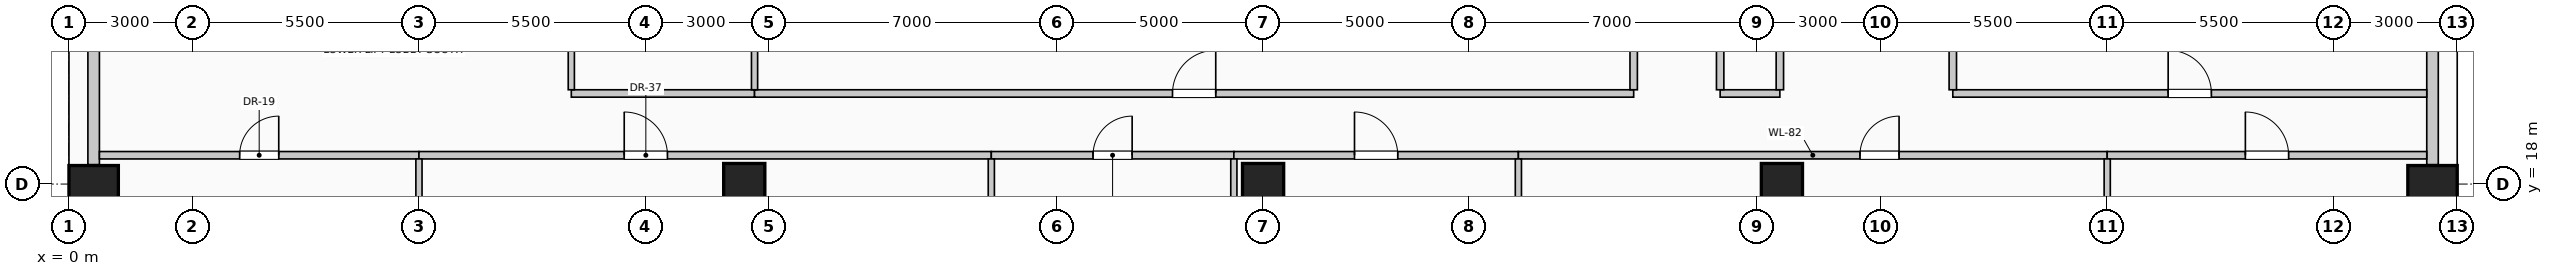
"""IFC4 building model, lengths in metres.
Left out: names, types, materials, properties, quantities, classifications, styles, units other than length and angle.
Written with IfcOpenShell. Run it as: python <this file> out.ifc"""

import sys

from ifc_helpers import new_model, si_unit, direction, frame, frame_2d, origin, origin_2d, place, context, subcontext, project, spatial, rectangle, circle, extrude, element, fill, save


model = new_model("IFC4")
c1 = context("Model", 3, precision=1e-05, world=origin(), true_north=direction((0.0, 1.0)))
c2 = subcontext(c1, "Body", "Model", "MODEL_VIEW")
j1 = project(units=[si_unit("LENGTHUNIT", "METRE"), si_unit("PLANEANGLEUNIT", "RADIAN")], contexts=[c1])
p1 = place(None, origin())
s1 = spatial("IfcSite", under=j1, at=p1, CompositionType="ELEMENT")
p2 = place(p1, origin())
s2 = spatial("IfcBuilding", under=s1, at=p2, CompositionType="ELEMENT")
p3 = place(p2, frame((0.0, 0.0, 74.6)))
s3 = spatial("IfcBuildingStorey", under=s2, at=p3, CompositionType="ELEMENT", Elevation=74.6)
for number, where, z_axis, x_axis in (
    (1, (0.6, 18.0, 0.0), (0.0, 0.0, 1.0), (0.0, 1.0, 0.0)),
    (2, (57.4, 18.0, 0.0), (0.0, 0.0, 1.0), (0.0, 1.0, 0.0)),
):
    element("IfcColumn", number, at=place(p3, frame(where, z_axis=z_axis, x_axis=x_axis)), inside=s3, PredefinedType="COLUMN", context=c2, shape_type="SweptSolid", body=[
        extrude(rectangle(XDim=0.9, YDim=1.2, at=origin_2d()), origin(), (0.0, 0.0, 1.0), 4.0),
    ])
for number, where, z_axis, x_axis in (
    (3, (16.4, 18.0, 0.0), (0.0, 0.0, 1.0), (1.0, 0.0, 0.0)),
    (4, (29.0, 18.0, 0.0), (0.0, 0.0, 1.0), (1.0, 0.0, 0.0)),
    (5, (41.6, 18.0, 0.0), (0.0, 0.0, 1.0), (1.0, 0.0, 0.0)),
):
    element("IfcColumn", number, at=place(p3, frame(where, z_axis=z_axis, x_axis=x_axis)), inside=s3, PredefinedType="COLUMN", context=c2, shape_type="SweptSolid", body=[
        extrude(circle(Radius=0.5, at=origin_2d()), origin(), (0.0, 0.0, 1.0), 4.0),
    ])
for number, where, z_axis, x_axis in (
    (6, (0.6, 18.47, 0.0), (0.0, 0.0, 1.0), (0.0, 1.0, 0.0)),
    (7, (57.4, 25.53, 0.0), (0.0, 0.0, 1.0), (0.0, -1.0, 0.0)),
):
    element("IfcWall", number, at=place(p3, frame(where, z_axis=z_axis, x_axis=x_axis)), inside=s3, PredefinedType="SOLIDWALL", context=c2, shape_type="SweptSolid", body=[
        extrude(rectangle(XDim=7.06, YDim=0.28, at=frame_2d((3.53, 0.0))), origin(), (0.0, 0.0, 1.0), 2.85),
    ])
p4 = place(p3, frame((0.74, 18.7, 0.0), z_axis=(0.0, 0.0, 1.0), x_axis=(1.0, 0.0, 0.0)))
e8 = element("IfcWall", 8, at=p4, inside=s3, PredefinedType="PARTITIONING", context=c2, shape_type="SweptSolid", body=[
    extrude(rectangle(XDim=7.76, YDim=0.18, at=frame_2d((3.88, 0.0))), origin(), (0.0, 0.0, 1.0), 3.7),
])
p5 = place(p4, frame((3.405, 0.0, 0.0)))
e9 = element("IfcOpeningElement", 9, at=p5, cuts=e8, PredefinedType="OPENING", context=c2, shape_type="SweptSolid", body=[
    extrude(rectangle(XDim=0.95, YDim=2.15, at=frame_2d((0.475, 1.075))), frame((0.0, 0.1, 0.0), z_axis=(0.0, -1.0, 0.0), x_axis=(1.0, 0.0, 0.0)), (0.0, 0.0, 1.0), 0.2),
])
p6 = place(p3, frame((8.5, 18.7, 0.0), z_axis=(0.0, 0.0, 1.0), x_axis=(1.0, 0.0, 0.0)))
e10 = element("IfcWall", 10, at=p6, inside=s3, PredefinedType="PARTITIONING", context=c2, shape_type="SweptSolid", body=[
    extrude(rectangle(XDim=13.9, YDim=0.18, at=frame_2d((6.95, 0.0))), origin(), (0.0, 0.0, 1.0), 3.7),
])
p7 = place(p6, frame((4.985, 0.0, 0.0)))
e11 = element("IfcOpeningElement", 11, at=p7, cuts=e10, PredefinedType="OPENING", context=c2, shape_type="SweptSolid", body=[
    extrude(rectangle(XDim=1.05, YDim=2.15, at=frame_2d((0.525, 1.075))), frame((0.0, 0.1, 0.0), z_axis=(0.0, -1.0, 0.0), x_axis=(1.0, 0.0, 0.0)), (0.0, 0.0, 1.0), 0.2),
])
p8 = place(p3, frame((22.4, 18.7, 0.0), z_axis=(0.0, 0.0, 1.0), x_axis=(1.0, 0.0, 0.0)))
e12 = element("IfcWall", 12, at=p8, inside=s3, PredefinedType="PARTITIONING", context=c2, shape_type="SweptSolid", body=[
    extrude(rectangle(XDim=5.89, YDim=0.18, at=frame_2d((2.945, 0.0))), origin(), (0.0, 0.0, 1.0), 3.7),
])
p9 = place(p8, frame((2.47, 0.0, 0.0)))
e13 = element("IfcOpeningElement", 13, at=p9, cuts=e12, PredefinedType="OPENING", context=c2, shape_type="SweptSolid", body=[
    extrude(rectangle(XDim=0.95, YDim=2.15, at=frame_2d((0.475, 1.075))), frame((0.0, 0.1, 0.0), z_axis=(0.0, -1.0, 0.0), x_axis=(1.0, 0.0, 0.0)), (0.0, 0.0, 1.0), 0.2),
])
p10 = place(p3, frame((28.29, 18.7, 0.0), z_axis=(0.0, 0.0, 1.0), x_axis=(1.0, 0.0, 0.0)))
e14 = element("IfcWall", 14, at=p10, inside=s3, PredefinedType="PARTITIONING", context=c2, shape_type="SweptSolid", body=[
    extrude(rectangle(XDim=6.91, YDim=0.18, at=frame_2d((3.455, 0.0))), origin(), (0.0, 0.0, 1.0), 3.7),
])
p11 = place(p10, frame((2.93, 0.0, 0.0)))
e15 = element("IfcOpeningElement", 15, at=p11, cuts=e14, PredefinedType="OPENING", context=c2, shape_type="SweptSolid", body=[
    extrude(rectangle(XDim=1.05, YDim=2.15, at=frame_2d((0.525, 1.075))), frame((0.0, 0.1, 0.0), z_axis=(0.0, -1.0, 0.0), x_axis=(1.0, 0.0, 0.0)), (0.0, 0.0, 1.0), 0.2),
])
p12 = place(p3, frame((35.2, 18.7, 0.0), z_axis=(0.0, 0.0, 1.0), x_axis=(1.0, 0.0, 0.0)))
e16 = element("IfcWall", 16, at=p12, inside=s3, PredefinedType="PARTITIONING", context=c2, shape_type="SweptSolid", body=[
    extrude(rectangle(XDim=14.3, YDim=0.18, at=frame_2d((7.15, 0.0))), origin(), (0.0, 0.0, 1.0), 3.7),
])
p13 = place(p12, frame((8.295, 0.0, 0.0)))
e17 = element("IfcOpeningElement", 17, at=p13, cuts=e16, PredefinedType="OPENING", context=c2, shape_type="SweptSolid", body=[
    extrude(rectangle(XDim=0.95, YDim=2.15, at=frame_2d((0.475, 1.075))), frame((0.0, 0.1, 0.0), z_axis=(0.0, -1.0, 0.0), x_axis=(1.0, 0.0, 0.0)), (0.0, 0.0, 1.0), 0.2),
])
p14 = place(p3, frame((49.5, 18.7, 0.0), z_axis=(0.0, 0.0, 1.0), x_axis=(1.0, 0.0, 0.0)))
e18 = element("IfcWall", 18, at=p14, inside=s3, PredefinedType="PARTITIONING", context=c2, shape_type="SweptSolid", body=[
    extrude(rectangle(XDim=7.76, YDim=0.18, at=frame_2d((3.88, 0.0))), origin(), (0.0, 0.0, 1.0), 3.7),
])
p15 = place(p14, frame((3.355, 0.0, 0.0)))
e19 = element("IfcOpeningElement", 19, at=p15, cuts=e18, PredefinedType="OPENING", context=c2, shape_type="SweptSolid", body=[
    extrude(rectangle(XDim=1.05, YDim=2.15, at=frame_2d((0.525, 1.075))), frame((0.0, 0.1, 0.0), z_axis=(0.0, -1.0, 0.0), x_axis=(1.0, 0.0, 0.0)), (0.0, 0.0, 1.0), 0.2),
])
p16 = place(p3, frame((12.2, 20.2, 0.0), z_axis=(0.0, 0.0, 1.0), x_axis=(1.0, 0.0, 0.0)))
e20 = element("IfcWall", 20, at=p16, inside=s3, PredefinedType="PARTITIONING", context=c2, shape_type="SweptSolid", body=[
    extrude(rectangle(XDim=4.45, YDim=0.18, at=frame_2d((2.225, 0.0))), origin(), (0.0, 0.0, 1.0), 3.7),
])
p17 = place(p3, frame((16.65, 20.2, 0.0), z_axis=(0.0, 0.0, 1.0), x_axis=(1.0, 0.0, 0.0)))
e21 = element("IfcWall", 21, at=p17, inside=s3, PredefinedType="PARTITIONING", context=c2, shape_type="SweptSolid", body=[
    extrude(rectangle(XDim=21.35, YDim=0.18, at=frame_2d((10.675, 0.0))), origin(), (0.0, 0.0, 1.0), 3.7),
])
p18 = place(p17, frame((10.15, 0.0, 0.0)))
e22 = element("IfcOpeningElement", 22, at=p18, cuts=e21, PredefinedType="OPENING", context=c2, shape_type="SweptSolid", body=[
    extrude(rectangle(XDim=1.05, YDim=2.15, at=frame_2d((0.525, 1.075))), frame((0.0, 0.1, 0.0), z_axis=(0.0, -1.0, 0.0), x_axis=(1.0, 0.0, 0.0)), (0.0, 0.0, 1.0), 0.2),
])
p19 = place(p3, frame((40.1, 20.2, 0.0), z_axis=(0.0, 0.0, 1.0), x_axis=(1.0, 0.0, 0.0)))
e23 = element("IfcWall", 23, at=p19, inside=s3, PredefinedType="PARTITIONING", context=c2, shape_type="SweptSolid", body=[
    extrude(rectangle(XDim=1.45, YDim=0.18, at=frame_2d((0.725, 0.0))), origin(), (0.0, 0.0, 1.0), 3.7),
])
p20 = place(p3, frame((45.75, 20.2, 0.0), z_axis=(0.0, 0.0, 1.0), x_axis=(1.0, 0.0, 0.0)))
e24 = element("IfcWall", 24, at=p20, inside=s3, PredefinedType="PARTITIONING", context=c2, shape_type="SweptSolid", body=[
    extrude(rectangle(XDim=11.51, YDim=0.18, at=frame_2d((5.755, 0.0))), origin(), (0.0, 0.0, 1.0), 3.7),
])
p21 = place(p20, frame((5.23, 0.0, 0.0)))
e25 = element("IfcOpeningElement", 25, at=p21, cuts=e24, PredefinedType="OPENING", context=c2, shape_type="SweptSolid", body=[
    extrude(rectangle(XDim=1.05, YDim=2.15, at=frame_2d((0.525, 1.075))), frame((0.0, 0.1, 0.0), z_axis=(0.0, -1.0, 0.0), x_axis=(1.0, 0.0, 0.0)), (0.0, 0.0, 1.0), 0.2),
])
p22 = place(p3, frame((8.5, 1.2, 0.0), z_axis=(0.0, 0.0, 1.0), x_axis=(0.0, 1.0, 0.0)))
e26 = element("IfcWall", 26, at=p22, inside=s3, PredefinedType="PARTITIONING", context=c2, shape_type="SweptSolid", body=[
    extrude(rectangle(XDim=17.41, YDim=0.15, at=frame_2d((8.705, 0.0))), origin(), (0.0, 0.0, 1.0), 3.7),
])
p23 = place(p3, frame((12.2, 20.29, 0.0), z_axis=(0.0, 0.0, 1.0), x_axis=(0.0, 1.0, 0.0)))
e27 = element("IfcWall", 27, at=p23, inside=s3, PredefinedType="PARTITIONING", context=c2, shape_type="SweptSolid", body=[
    extrude(rectangle(XDim=1.81, YDim=0.15, at=frame_2d((0.905, 0.0))), origin(), (0.0, 0.0, 1.0), 3.7),
])
p24 = place(p3, frame((16.65, 20.29, 0.0), z_axis=(0.0, 0.0, 1.0), x_axis=(0.0, 1.0, 0.0)))
e28 = element("IfcWall", 28, at=p24, inside=s3, PredefinedType="PARTITIONING", context=c2, shape_type="SweptSolid", body=[
    extrude(rectangle(XDim=7.835, YDim=0.15, at=frame_2d((3.917, 0.0))), origin(), (0.0, 0.0, 1.0), 2.995),
])
for number, where, z_axis, x_axis in (
    (29, (22.4, 0.74, 0.0), (0.0, 0.0, 1.0), (0.0, 1.0, 0.0)),
    (30, (28.29, 0.74, 0.0), (0.0, 0.0, 1.0), (0.0, 1.0, 0.0)),
    (31, (35.2, 0.74, 0.0), (0.0, 0.0, 1.0), (0.0, 1.0, 0.0)),
):
    element("IfcWall", number, at=place(p3, frame(where, z_axis=z_axis, x_axis=x_axis)), inside=s3, PredefinedType="PARTITIONING", context=c2, shape_type="SweptSolid", body=[
        extrude(rectangle(XDim=17.87, YDim=0.15, at=frame_2d((8.935, 0.0))), origin(), (0.0, 0.0, 1.0), 3.7),
    ])
p25 = place(p3, frame((38.0, 20.29, 0.0), z_axis=(0.0, 0.0, 1.0), x_axis=(0.0, 1.0, 0.0)))
e32 = element("IfcWall", 32, at=p25, inside=s3, PredefinedType="PARTITIONING", context=c2, shape_type="SweptSolid", body=[
    extrude(rectangle(XDim=7.835, YDim=0.18, at=frame_2d((3.917, 0.0))), origin(), (0.0, 0.0, 1.0), 3.7),
])
p26 = place(p3, frame((40.1, 20.29, 0.0), z_axis=(0.0, 0.0, 1.0), x_axis=(0.0, 1.0, 0.0)))
e33 = element("IfcWall", 33, at=p26, inside=s3, PredefinedType="PARTITIONING", context=c2, shape_type="SweptSolid", body=[
    extrude(rectangle(XDim=9.82, YDim=0.18, at=frame_2d((4.91, 0.0))), origin(), (0.0, 0.0, 1.0), 3.7),
])
p27 = place(p3, frame((41.55, 20.29, 0.0), z_axis=(0.0, 0.0, 1.0), x_axis=(0.0, 1.0, 0.0)))
e34 = element("IfcWall", 34, at=p27, inside=s3, PredefinedType="PARTITIONING", context=c2, shape_type="SweptSolid", body=[
    extrude(rectangle(XDim=9.835, YDim=0.18, at=frame_2d((4.917, 0.0))), origin(), (0.0, 0.0, 1.0), 2.995),
])
p28 = place(p3, frame((45.75, 20.29, 0.0), z_axis=(0.0, 0.0, 1.0), x_axis=(0.0, 1.0, 0.0)))
e35 = element("IfcWall", 35, at=p28, inside=s3, PredefinedType="PARTITIONING", context=c2, shape_type="SweptSolid", body=[
    extrude(rectangle(XDim=11.985, YDim=0.18, at=frame_2d((5.992, 0.0))), origin(), (0.0, 0.0, 1.0), 3.7),
])
p29 = place(p3, frame((49.5, 1.2, 0.0), z_axis=(0.0, 0.0, 1.0), x_axis=(0.0, 1.0, 0.0)))
e36 = element("IfcWall", 36, at=p29, inside=s3, PredefinedType="PARTITIONING", context=c2, shape_type="SweptSolid", body=[
    extrude(rectangle(XDim=17.41, YDim=0.15, at=frame_2d((8.705, 0.0))), origin(), (0.0, 0.0, 1.0), 3.7),
])
p30 = place(p5, origin())
e37 = element("IfcDoor", 37, at=p30, inside=s3, OperationType="SINGLE_SWING_RIGHT", PredefinedType="DOOR", context=c2, shape_type="SweptSolid", body=[
    extrude(rectangle(XDim=0.95, YDim=2.15, at=frame_2d((0.475, 1.075))), frame((0.0, 0.025, 0.0), z_axis=(0.0, -1.0, 0.0), x_axis=(1.0, 0.0, 0.0)), (0.0, 0.0, 1.0), 0.05),
])
fill(e9, e37)
p31 = place(p7, origin())
e38 = element("IfcDoor", 38, at=p31, inside=s3, OperationType="SINGLE_SWING_LEFT", PredefinedType="DOOR", context=c2, shape_type="SweptSolid", body=[
    extrude(rectangle(XDim=1.05, YDim=2.15, at=frame_2d((0.525, 1.075))), frame((0.0, 0.025, 0.0), z_axis=(0.0, -1.0, 0.0), x_axis=(1.0, 0.0, 0.0)), (0.0, 0.0, 1.0), 0.05),
])
fill(e11, e38)
p32 = place(p9, origin())
e39 = element("IfcDoor", 39, at=p32, inside=s3, OperationType="SINGLE_SWING_RIGHT", PredefinedType="DOOR", context=c2, shape_type="SweptSolid", body=[
    extrude(rectangle(XDim=0.95, YDim=2.15, at=frame_2d((0.475, 1.075))), frame((0.0, 0.025, 0.0), z_axis=(0.0, -1.0, 0.0), x_axis=(1.0, 0.0, 0.0)), (0.0, 0.0, 1.0), 0.05),
])
fill(e13, e39)
p33 = place(p11, origin())
e40 = element("IfcDoor", 40, at=p33, inside=s3, OperationType="SINGLE_SWING_LEFT", PredefinedType="DOOR", context=c2, shape_type="SweptSolid", body=[
    extrude(rectangle(XDim=1.05, YDim=2.15, at=frame_2d((0.525, 1.075))), frame((0.0, 0.025, 0.0), z_axis=(0.0, -1.0, 0.0), x_axis=(1.0, 0.0, 0.0)), (0.0, 0.0, 1.0), 0.05),
])
fill(e15, e40)
p34 = place(p13, origin())
e41 = element("IfcDoor", 41, at=p34, inside=s3, OperationType="SINGLE_SWING_RIGHT", PredefinedType="DOOR", context=c2, shape_type="SweptSolid", body=[
    extrude(rectangle(XDim=0.95, YDim=2.15, at=frame_2d((0.475, 1.075))), frame((0.0, 0.025, 0.0), z_axis=(0.0, -1.0, 0.0), x_axis=(1.0, 0.0, 0.0)), (0.0, 0.0, 1.0), 0.05),
])
fill(e17, e41)
p35 = place(p15, origin())
e42 = element("IfcDoor", 42, at=p35, inside=s3, OperationType="SINGLE_SWING_LEFT", PredefinedType="DOOR", context=c2, shape_type="SweptSolid", body=[
    extrude(rectangle(XDim=1.05, YDim=2.15, at=frame_2d((0.525, 1.075))), frame((0.0, 0.025, 0.0), z_axis=(0.0, -1.0, 0.0), x_axis=(1.0, 0.0, 0.0)), (0.0, 0.0, 1.0), 0.05),
])
fill(e19, e42)
p36 = place(p18, origin())
e43 = element("IfcDoor", 43, at=p36, inside=s3, OperationType="SINGLE_SWING_RIGHT", PredefinedType="DOOR", context=c2, shape_type="SweptSolid", body=[
    extrude(rectangle(XDim=1.05, YDim=2.15, at=frame_2d((0.525, 1.075))), frame((0.0, 0.025, 0.0), z_axis=(0.0, -1.0, 0.0), x_axis=(1.0, 0.0, 0.0)), (0.0, 0.0, 1.0), 0.05),
])
fill(e22, e43)
p37 = place(p21, origin())
e44 = element("IfcDoor", 44, at=p37, inside=s3, OperationType="SINGLE_SWING_LEFT", PredefinedType="DOOR", context=c2, shape_type="SweptSolid", body=[
    extrude(rectangle(XDim=1.05, YDim=2.15, at=frame_2d((0.525, 1.075))), frame((0.0, 0.025, 0.0), z_axis=(0.0, -1.0, 0.0), x_axis=(1.0, 0.0, 0.0)), (0.0, 0.0, 1.0), 0.05),
])
fill(e25, e44)
save(model, sys.argv[1])
